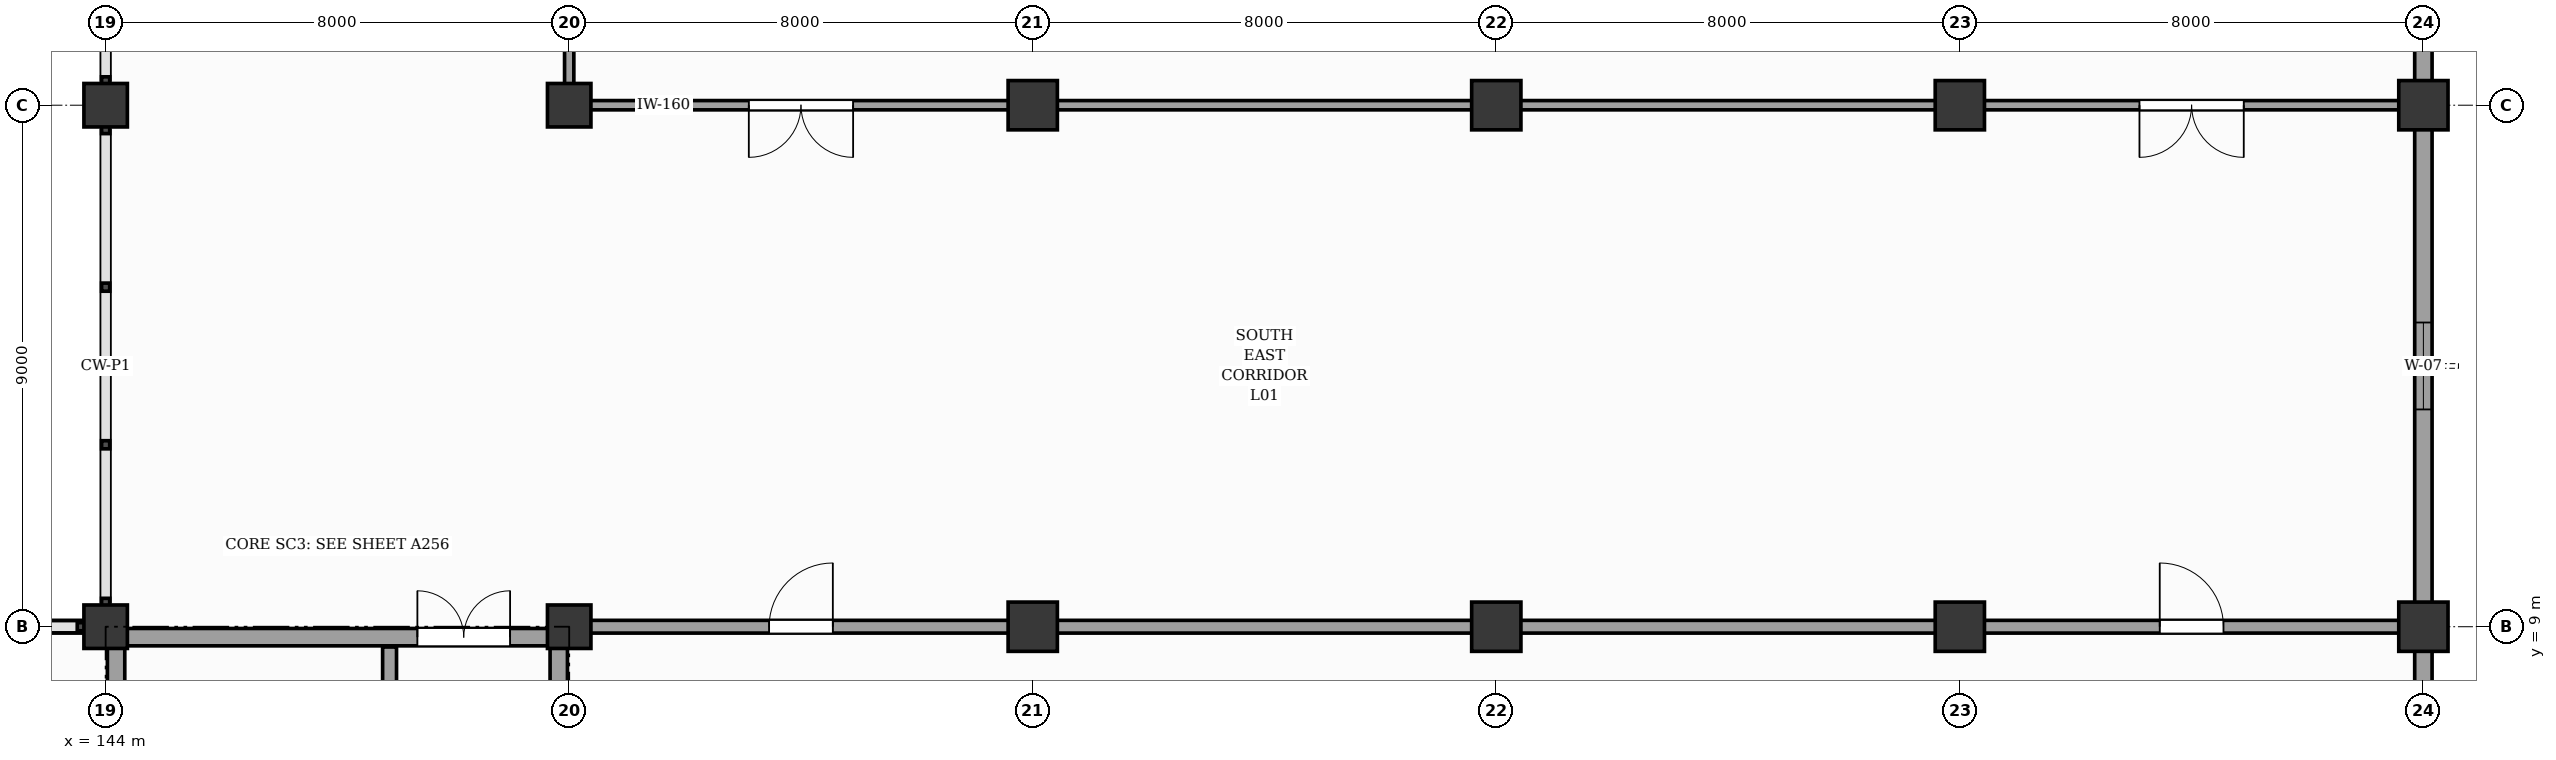
"""IFC4 building model, lengths in metres.
Left out: names, types, materials, properties, quantities, classifications, styles, units other than length and angle.
Written with IfcOpenShell. Run it as: python <this file> out.ifc"""

import sys

from ifc_helpers import new_model, si_unit, direction, frame, frame_2d, origin, origin_2d, place, context, subcontext, project, spatial, rectangle, extrude, element, fill, save


model = new_model("IFC4")
c1 = context("Model", 3, precision=1e-05, world=origin(), true_north=direction((0.0, 1.0)))
c2 = subcontext(c1, "Body", "Model", "MODEL_VIEW")
j1 = project(units=[si_unit("LENGTHUNIT", "METRE"), si_unit("PLANEANGLEUNIT", "RADIAN")], contexts=[c1])
p1 = place(None, origin())
s1 = spatial("IfcSite", under=j1, at=p1, CompositionType="ELEMENT")
p2 = place(p1, origin())
s2 = spatial("IfcBuilding", under=s1, at=p2, CompositionType="ELEMENT")
p3 = place(p2, frame((0.0, 0.0, 4.8)))
s3 = spatial("IfcBuildingStorey", under=s2, at=p3, CompositionType="ELEMENT", Elevation=4.8)
for number, where, z_axis, x_axis in (
    (1, (144.0, 9.0, 0.0), (0.0, 0.0, 1.0), (1.0, 0.0, 0.0)),
    (2, (144.0, 18.0, 0.0), (0.0, 0.0, 1.0), (1.0, 0.0, 0.0)),
    (3, (152.0, 9.0, 0.0), (0.0, 0.0, 1.0), (1.0, 0.0, 0.0)),
    (4, (152.0, 18.0, 0.0), (0.0, 0.0, 1.0), (1.0, 0.0, 0.0)),
):
    element("IfcColumn", number, at=place(p3, frame(where, z_axis=z_axis, x_axis=x_axis)), inside=s3, PredefinedType="COLUMN", context=c2, shape_type="SweptSolid", body=[
        extrude(rectangle(XDim=0.75, YDim=0.75, at=origin_2d()), origin(), (0.0, 0.0, 1.0), 4.8),
    ])
for number, where, z_axis, x_axis in (
    (5, (160.0, 9.0, 0.0), (0.0, 0.0, 1.0), (1.0, 0.0, 0.0)),
    (6, (160.0, 18.0, 0.0), (0.0, 0.0, 1.0), (1.0, 0.0, 0.0)),
    (7, (168.0, 9.0, 0.0), (0.0, 0.0, 1.0), (1.0, 0.0, 0.0)),
    (8, (168.0, 18.0, 0.0), (0.0, 0.0, 1.0), (1.0, 0.0, 0.0)),
    (9, (176.0, 9.0, 0.0), (0.0, 0.0, 1.0), (1.0, 0.0, 0.0)),
    (10, (176.0, 18.0, 0.0), (0.0, 0.0, 1.0), (1.0, 0.0, 0.0)),
    (11, (184.0, 9.0, 0.0), (0.0, 0.0, 1.0), (1.0, 0.0, 0.0)),
    (12, (184.0, 18.0, 0.0), (0.0, 0.0, 1.0), (1.0, 0.0, 0.0)),
):
    element("IfcColumn", number, at=place(p3, frame(where, z_axis=z_axis, x_axis=x_axis)), inside=s3, PredefinedType="COLUMN", context=c2, shape_type="SweptSolid", body=[
        extrude(rectangle(XDim=0.85, YDim=0.85, at=origin_2d()), origin(), (0.0, 0.0, 1.0), 4.8),
    ])
p4 = place(p3, frame((184.0, 0.345, 0.0), z_axis=(0.0, 0.0, 1.0), x_axis=(0.0, 1.0, 0.0)))
e13 = element("IfcWall", 13, at=p4, inside=s3, PredefinedType="SOLIDWALL", context=c2, shape_type="SweptSolid", body=[
    extrude(rectangle(XDim=8.255, YDim=0.3, at=frame_2d((4.127, 0.0))), origin(), (0.0, 0.0, 1.0), 3.66),
])
p5 = place(p4, frame((3.405, 0.0, 0.95)))
e14 = element("IfcOpeningElement", 14, at=p5, cuts=e13, PredefinedType="OPENING", context=c2, shape_type="SweptSolid", body=[
    extrude(rectangle(XDim=1.5, YDim=1.9, at=frame_2d((0.75, 0.95))), frame((0.0, 0.16, 0.0), z_axis=(0.0, -1.0, 0.0), x_axis=(1.0, 0.0, 0.0)), (0.0, 0.0, 1.0), 0.32),
])
p6 = place(p3, frame((184.0, 9.4, 0.0), z_axis=(0.0, 0.0, 1.0), x_axis=(0.0, 1.0, 0.0)))
e15 = element("IfcWall", 15, at=p6, inside=s3, PredefinedType="SOLIDWALL", context=c2, shape_type="SweptSolid", body=[
    extrude(rectangle(XDim=8.2, YDim=0.3, at=frame_2d((4.1, 0.0))), origin(), (0.0, 0.0, 1.0), 3.66),
])
p7 = place(p6, frame((3.35, 0.0, 0.95)))
e16 = element("IfcOpeningElement", 16, at=p7, cuts=e15, PredefinedType="OPENING", context=c2, shape_type="SweptSolid", body=[
    extrude(rectangle(XDim=1.5, YDim=1.9, at=frame_2d((0.75, 0.95))), frame((0.0, 0.16, 0.0), z_axis=(0.0, -1.0, 0.0), x_axis=(1.0, 0.0, 0.0)), (0.0, 0.0, 1.0), 0.32),
])
p8 = place(p3, frame((184.0, 18.4, 0.0), z_axis=(0.0, 0.0, 1.0), x_axis=(0.0, 1.0, 0.0)))
e17 = element("IfcWall", 17, at=p8, inside=s3, PredefinedType="SOLIDWALL", context=c2, shape_type="SweptSolid", body=[
    extrude(rectangle(XDim=8.2, YDim=0.3, at=frame_2d((4.1, 0.0))), origin(), (0.0, 0.0, 1.0), 3.66),
])
p9 = place(p8, frame((3.35, 0.0, 0.95)))
e18 = element("IfcOpeningElement", 18, at=p9, cuts=e17, PredefinedType="OPENING", context=c2, shape_type="SweptSolid", body=[
    extrude(rectangle(XDim=1.5, YDim=1.9, at=frame_2d((0.75, 0.95))), frame((0.0, 0.16, 0.0), z_axis=(0.0, -1.0, 0.0), x_axis=(1.0, 0.0, 0.0)), (0.0, 0.0, 1.0), 0.32),
])
p10 = place(p3, frame((148.9, 0.35, 0.0), z_axis=(0.0, 0.0, 1.0), x_axis=(0.0, 1.0, 0.0)))
e19 = element("IfcWall", 19, at=p10, inside=s3, PredefinedType="SHEAR", context=c2, shape_type="SweptSolid", body=[
    extrude(rectangle(XDim=8.3, YDim=0.24, at=frame_2d((4.15, 0.0))), origin(), (0.0, 0.0, 1.0), 4.52),
])
p11 = place(p10, frame((6.45, 0.0, 0.0)))
e20 = element("IfcOpeningElement", 20, at=p11, cuts=e19, PredefinedType="OPENING", context=c2, shape_type="SweptSolid", body=[
    extrude(rectangle(XDim=1.2, YDim=2.15, at=frame_2d((0.6, 1.075))), frame((0.0, 0.13, 0.0), z_axis=(0.0, -1.0, 0.0), x_axis=(1.0, 0.0, 0.0)), (0.0, 0.0, 1.0), 0.26),
])
for number, where, z_axis, x_axis in (
    (21, (144.18, 0.18, 0.0), (0.0, 0.0, 1.0), (0.0, 1.0, 0.0)),
    (22, (151.82, 0.18, 0.0), (0.0, 0.0, 1.0), (0.0, 1.0, 0.0)),
):
    element("IfcWall", number, at=place(p3, frame(where, z_axis=z_axis, x_axis=x_axis)), inside=s3, PredefinedType="SHEAR", context=c2, shape_type="SweptSolid", body=[
        extrude(rectangle(XDim=8.64, YDim=0.3, at=frame_2d((4.32, 0.0))), origin(), (0.0, 0.0, 1.0), 4.52),
    ])
p12 = place(p3, frame((144.03, 8.82, 0.0), z_axis=(0.0, 0.0, 1.0), x_axis=(1.0, 0.0, 0.0)))
e23 = element("IfcWall", 23, at=p12, inside=s3, PredefinedType="SHEAR", context=c2, shape_type="SweptSolid", body=[
    extrude(rectangle(XDim=7.94, YDim=0.3, at=frame_2d((3.97, 0.0))), origin(), (0.0, 0.0, 1.0), 4.52),
])
p13 = place(p12, frame((5.35, 0.0, 0.0)))
e24 = element("IfcOpeningElement", 24, at=p13, cuts=e23, PredefinedType="OPENING", context=c2, shape_type="SweptSolid", body=[
    extrude(rectangle(XDim=1.6, YDim=2.15, at=frame_2d((0.8, 1.075))), frame((0.0, 0.16, 0.0), z_axis=(0.0, -1.0, 0.0), x_axis=(1.0, 0.0, 0.0)), (0.0, 0.0, 1.0), 0.32),
])
p14 = place(p3, frame((136.3, 9.0, 0.0), z_axis=(0.0, 0.0, 1.0), x_axis=(1.0, 0.0, 0.0)))
e25 = element("IfcWall", 25, at=p14, inside=s3, PredefinedType="SOLIDWALL", context=c2, shape_type="SweptSolid", body=[
    extrude(rectangle(XDim=7.4, YDim=0.22, at=frame_2d((3.7, 0.0))), origin(), (0.0, 0.0, 1.0), 3.66),
])
p15 = place(p3, frame((152.3, 18.0, 0.0), z_axis=(0.0, 0.0, 1.0), x_axis=(1.0, 0.0, 0.0)))
e26 = element("IfcWall", 26, at=p15, inside=s3, PredefinedType="PARTITIONING", context=c2, shape_type="SweptSolid", body=[
    extrude(rectangle(XDim=7.4, YDim=0.16, at=frame_2d((3.7, 0.0))), origin(), (0.0, 0.0, 1.0), 3.66),
])
p16 = place(p15, frame((2.8, 0.0, 0.0)))
e27 = element("IfcOpeningElement", 27, at=p16, cuts=e26, PredefinedType="OPENING", context=c2, shape_type="SweptSolid", body=[
    extrude(rectangle(XDim=1.8, YDim=2.25, at=frame_2d((0.9, 1.125))), frame((0.0, 0.09, 0.0), z_axis=(0.0, -1.0, 0.0), x_axis=(1.0, 0.0, 0.0)), (0.0, 0.0, 1.0), 0.18),
])
for number, where, z_axis, x_axis in (
    (28, (160.3, 18.0, 0.0), (0.0, 0.0, 1.0), (1.0, 0.0, 0.0)),
    (29, (168.3, 18.0, 0.0), (0.0, 0.0, 1.0), (1.0, 0.0, 0.0)),
):
    element("IfcWall", number, at=place(p3, frame(where, z_axis=z_axis, x_axis=x_axis)), inside=s3, PredefinedType="PARTITIONING", context=c2, shape_type="SweptSolid", body=[
        extrude(rectangle(XDim=7.4, YDim=0.16, at=frame_2d((3.7, 0.0))), origin(), (0.0, 0.0, 1.0), 3.66),
    ])
p17 = place(p3, frame((176.3, 18.0, 0.0), z_axis=(0.0, 0.0, 1.0), x_axis=(1.0, 0.0, 0.0)))
e30 = element("IfcWall", 30, at=p17, inside=s3, PredefinedType="PARTITIONING", context=c2, shape_type="SweptSolid", body=[
    extrude(rectangle(XDim=7.4, YDim=0.16, at=frame_2d((3.7, 0.0))), origin(), (0.0, 0.0, 1.0), 3.66),
])
p18 = place(p17, frame((2.8, 0.0, 0.0)))
e31 = element("IfcOpeningElement", 31, at=p18, cuts=e30, PredefinedType="OPENING", context=c2, shape_type="SweptSolid", body=[
    extrude(rectangle(XDim=1.8, YDim=2.25, at=frame_2d((0.9, 1.125))), frame((0.0, 0.09, 0.0), z_axis=(0.0, -1.0, 0.0), x_axis=(1.0, 0.0, 0.0)), (0.0, 0.0, 1.0), 0.18),
])
p19 = place(p3, frame((152.0, 18.3, 0.0), z_axis=(0.0, 0.0, 1.0), x_axis=(0.0, 1.0, 0.0)))
e32 = element("IfcWall", 32, at=p19, inside=s3, PredefinedType="PARTITIONING", context=c2, shape_type="SweptSolid", body=[
    extrude(rectangle(XDim=8.4, YDim=0.16, at=frame_2d((4.2, 0.0))), origin(), (0.0, 0.0, 1.0), 3.66),
])
p20 = place(p3, frame((152.3, 9.0, 0.0), z_axis=(0.0, 0.0, 1.0), x_axis=(1.0, 0.0, 0.0)))
e33 = element("IfcWall", 33, at=p20, inside=s3, PredefinedType="SOLIDWALL", context=c2, shape_type="SweptSolid", body=[
    extrude(rectangle(XDim=7.4, YDim=0.22, at=frame_2d((3.7, 0.0))), origin(), (0.0, 0.0, 1.0), 3.66),
])
p21 = place(p20, frame((3.15, 0.0, 0.0)))
e34 = element("IfcOpeningElement", 34, at=p21, cuts=e33, PredefinedType="OPENING", context=c2, shape_type="SweptSolid", body=[
    extrude(rectangle(XDim=1.1, YDim=2.15, at=frame_2d((0.55, 1.075))), frame((0.0, 0.12, 0.0), z_axis=(0.0, -1.0, 0.0), x_axis=(1.0, 0.0, 0.0)), (0.0, 0.0, 1.0), 0.24),
])
for number, where, z_axis, x_axis in (
    (35, (160.3, 9.0, 0.0), (0.0, 0.0, 1.0), (1.0, 0.0, 0.0)),
    (36, (168.3, 9.0, 0.0), (0.0, 0.0, 1.0), (1.0, 0.0, 0.0)),
):
    element("IfcWall", number, at=place(p3, frame(where, z_axis=z_axis, x_axis=x_axis)), inside=s3, PredefinedType="SOLIDWALL", context=c2, shape_type="SweptSolid", body=[
        extrude(rectangle(XDim=7.4, YDim=0.22, at=frame_2d((3.7, 0.0))), origin(), (0.0, 0.0, 1.0), 3.66),
    ])
p22 = place(p3, frame((176.3, 9.0, 0.0), z_axis=(0.0, 0.0, 1.0), x_axis=(1.0, 0.0, 0.0)))
e37 = element("IfcWall", 37, at=p22, inside=s3, PredefinedType="SOLIDWALL", context=c2, shape_type="SweptSolid", body=[
    extrude(rectangle(XDim=7.4, YDim=0.22, at=frame_2d((3.7, 0.0))), origin(), (0.0, 0.0, 1.0), 3.66),
])
p23 = place(p22, frame((3.15, 0.0, 0.0)))
e38 = element("IfcOpeningElement", 38, at=p23, cuts=e37, PredefinedType="OPENING", context=c2, shape_type="SweptSolid", body=[
    extrude(rectangle(XDim=1.1, YDim=2.15, at=frame_2d((0.55, 1.075))), frame((0.0, 0.12, 0.0), z_axis=(0.0, -1.0, 0.0), x_axis=(1.0, 0.0, 0.0)), (0.0, 0.0, 1.0), 0.24),
])
p24 = place(p7, origin())
e39 = element("IfcWindow", 39, at=p24, inside=s3, PartitioningType="SINGLE_PANEL", PredefinedType="WINDOW", context=c2, shape_type="SweptSolid", body=[
    extrude(rectangle(XDim=1.5, YDim=1.9, at=frame_2d((0.75, 0.95))), frame((0.0, 0.03, 0.0), z_axis=(0.0, -1.0, 0.0), x_axis=(1.0, 0.0, 0.0)), (0.0, 0.0, 1.0), 0.06),
])
fill(e16, e39)
p25 = place(p13, origin())
e40 = element("IfcDoor", 40, at=p25, inside=s3, OperationType="DOUBLE_DOOR_SINGLE_SWING", PredefinedType="DOOR", context=c2, shape_type="SweptSolid", body=[
    extrude(rectangle(XDim=1.6, YDim=2.15, at=frame_2d((0.8, 1.075))), frame((0.0, 0.025, 0.0), z_axis=(0.0, -1.0, 0.0), x_axis=(1.0, 0.0, 0.0)), (0.0, 0.0, 1.0), 0.05),
])
fill(e24, e40)
p26 = place(p16, frame((1.8, 0.0, 0.0), z_axis=(0.0, 0.0, 1.0), x_axis=(-1.0, 0.0, 0.0)))
e41 = element("IfcDoor", 41, at=p26, inside=s3, OperationType="DOUBLE_DOOR_SINGLE_SWING", PredefinedType="DOOR", context=c2, shape_type="SweptSolid", body=[
    extrude(rectangle(XDim=1.8, YDim=2.25, at=frame_2d((0.9, 1.125))), frame((0.0, 0.025, 0.0), z_axis=(0.0, -1.0, 0.0), x_axis=(1.0, 0.0, 0.0)), (0.0, 0.0, 1.0), 0.05),
])
fill(e27, e41)
p27 = place(p18, frame((1.8, 0.0, 0.0), z_axis=(0.0, 0.0, 1.0), x_axis=(-1.0, 0.0, 0.0)))
e42 = element("IfcDoor", 42, at=p27, inside=s3, OperationType="DOUBLE_DOOR_SINGLE_SWING", PredefinedType="DOOR", context=c2, shape_type="SweptSolid", body=[
    extrude(rectangle(XDim=1.8, YDim=2.25, at=frame_2d((0.9, 1.125))), frame((0.0, 0.025, 0.0), z_axis=(0.0, -1.0, 0.0), x_axis=(1.0, 0.0, 0.0)), (0.0, 0.0, 1.0), 0.05),
])
fill(e31, e42)
p28 = place(p21, origin())
e43 = element("IfcDoor", 43, at=p28, inside=s3, OperationType="SINGLE_SWING_RIGHT", PredefinedType="DOOR", context=c2, shape_type="SweptSolid", body=[
    extrude(rectangle(XDim=1.1, YDim=2.15, at=frame_2d((0.55, 1.075))), frame((0.0, 0.025, 0.0), z_axis=(0.0, -1.0, 0.0), x_axis=(1.0, 0.0, 0.0)), (0.0, 0.0, 1.0), 0.05),
])
fill(e34, e43)
p29 = place(p23, origin())
e44 = element("IfcDoor", 44, at=p29, inside=s3, OperationType="SINGLE_SWING_LEFT", PredefinedType="DOOR", context=c2, shape_type="SweptSolid", body=[
    extrude(rectangle(XDim=1.1, YDim=2.15, at=frame_2d((0.55, 1.075))), frame((0.0, 0.025, 0.0), z_axis=(0.0, -1.0, 0.0), x_axis=(1.0, 0.0, 0.0)), (0.0, 0.0, 1.0), 0.05),
])
fill(e38, e44)
save(model, sys.argv[1])
